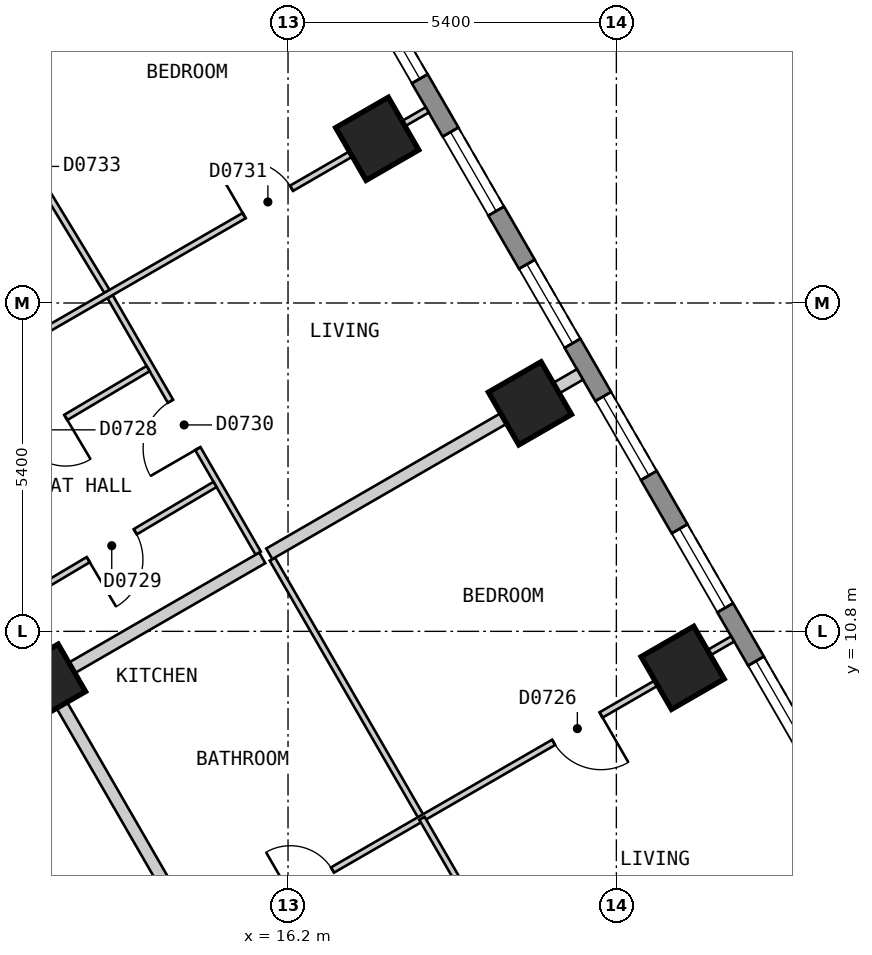
"""IFC4 building model, lengths in metres.
Left out: names, types, materials, properties, quantities, classifications, styles, units other than length and angle.
Written with IfcOpenShell. Run it as: python <this file> out.ifc"""

import sys

from ifc_helpers import new_model, si_unit, direction, frame, frame_2d, origin, origin_2d, place, context, subcontext, project, spatial, polyline, rectangle, outline, extrude, element, fill, save


model = new_model("IFC4")
c1 = context("Model", 3, precision=1e-05, world=origin(), true_north=direction((0.0, 1.0)))
c2 = subcontext(c1, "Body", "Model", "MODEL_VIEW")
j1 = project(units=[si_unit("LENGTHUNIT", "METRE"), si_unit("PLANEANGLEUNIT", "RADIAN")], contexts=[c1])
p1 = place(None, origin())
s1 = spatial("IfcSite", under=j1, at=p1, CompositionType="ELEMENT")
p2 = place(p1, origin())
s2 = spatial("IfcBuilding", under=s1, at=p2, CompositionType="ELEMENT")
p3 = place(p2, frame((0.0, 0.0, 93.0)))
s3 = spatial("IfcBuildingStorey", under=s2, at=p3, CompositionType="ELEMENT", Elevation=93.0)
for number, where, z_axis, x_axis in (
    (1, (22.69, 10.2, 0.0), (0.0, 0.0, 1.0), (-0.5, 0.866, 0.0)),
    (2, (20.179, 14.55, 0.0), (0.0, 0.0, 1.0), (-0.5, 0.866, 0.0)),
    (3, (17.667, 18.9, 0.0), (0.0, 0.0, 1.0), (-0.5, 0.866, 0.0)),
):
    element("IfcColumn", number, at=place(p3, frame(where, z_axis=z_axis, x_axis=x_axis)), inside=s3, PredefinedType="COLUMN", context=c2, shape_type="SweptSolid", body=[
        extrude(rectangle(XDim=1.0, YDim=1.0, at=origin_2d()), origin(), (0.0, 0.0, 1.0), 3.0),
    ])
p4 = place(p3, frame((12.255, 9.975, 0.0), z_axis=(0.0, 0.0, 1.0), x_axis=(-0.5, 0.866025403784, 0.0)))
e4 = element("IfcColumn", 4, at=p4, inside=s3, PredefinedType="COLUMN", context=c2, shape_type="SweptSolid", body=[
    extrude(rectangle(XDim=0.9, YDim=0.9, at=origin_2d()), origin(), (0.0, 0.0, 1.0), 3.0),
])
p5 = place(p3, frame((29.027, 1.425, 0.0), z_axis=(0.0, 0.0, 1.0), x_axis=(-0.500027479704, 0.866009537788, 0.0)))
e5 = element("IfcWall", 5, at=p5, inside=s3, PredefinedType="SOLIDWALL", context=c2, shape_type="SweptSolid", body=[
    extrude(outline(polyline([(0.0, -0.15), (26.559, -0.15), (26.478, 0.15), (0.08, 0.15), (0.0, -0.15)])), origin(), (0.0, 0.0, 1.0), 2.7),
])
p6 = place(p5, frame((1.227, 0.0, 0.15)))
e6 = element("IfcOpeningElement", 6, at=p6, cuts=e5, PredefinedType="OPENING", context=c2, shape_type="SweptSolid", body=[
    extrude(rectangle(XDim=1.5, YDim=2.1, at=frame_2d((0.75, 1.05))), frame((0.0, 0.16, 0.0), z_axis=(0.0, -1.0, 0.0), x_axis=(1.0, 0.0, 0.0)), (0.0, 0.0, 1.0), 0.32),
])
p7 = place(p5, frame((3.738, 0.0, 0.15)))
e7 = element("IfcOpeningElement", 7, at=p7, cuts=e5, PredefinedType="OPENING", context=c2, shape_type="SweptSolid", body=[
    extrude(rectangle(XDim=1.5, YDim=2.1, at=frame_2d((0.75, 1.05))), frame((0.0, 0.16, 0.0), z_axis=(0.0, -1.0, 0.0), x_axis=(1.0, 0.0, 0.0)), (0.0, 0.0, 1.0), 0.32),
])
p8 = place(p5, frame((6.25, 0.0, 0.15)))
e8 = element("IfcOpeningElement", 8, at=p8, cuts=e5, PredefinedType="OPENING", context=c2, shape_type="SweptSolid", body=[
    extrude(rectangle(XDim=1.5, YDim=2.1, at=frame_2d((0.75, 1.05))), frame((0.0, 0.16, 0.0), z_axis=(0.0, -1.0, 0.0), x_axis=(1.0, 0.0, 0.0)), (0.0, 0.0, 1.0), 0.32),
])
p9 = place(p5, frame((8.761, 0.0, 0.15)))
e9 = element("IfcOpeningElement", 9, at=p9, cuts=e5, PredefinedType="OPENING", context=c2, shape_type="SweptSolid", body=[
    extrude(rectangle(XDim=1.5, YDim=2.1, at=frame_2d((0.75, 1.05))), frame((0.0, 0.16, 0.0), z_axis=(0.0, -1.0, 0.0), x_axis=(1.0, 0.0, 0.0)), (0.0, 0.0, 1.0), 0.32),
])
p10 = place(p5, frame((11.273, 0.0, 0.15)))
e10 = element("IfcOpeningElement", 10, at=p10, cuts=e5, PredefinedType="OPENING", context=c2, shape_type="SweptSolid", body=[
    extrude(rectangle(XDim=1.5, YDim=2.1, at=frame_2d((0.75, 1.05))), frame((0.0, 0.16, 0.0), z_axis=(0.0, -1.0, 0.0), x_axis=(1.0, 0.0, 0.0)), (0.0, 0.0, 1.0), 0.32),
])
p11 = place(p5, frame((13.785, 0.0, 0.15)))
e11 = element("IfcOpeningElement", 11, at=p11, cuts=e5, PredefinedType="OPENING", context=c2, shape_type="SweptSolid", body=[
    extrude(rectangle(XDim=1.5, YDim=2.1, at=frame_2d((0.75, 1.05))), frame((0.0, 0.16, 0.0), z_axis=(0.0, -1.0, 0.0), x_axis=(1.0, 0.0, 0.0)), (0.0, 0.0, 1.0), 0.32),
])
p12 = place(p5, frame((16.296, 0.0, 0.15)))
e12 = element("IfcOpeningElement", 12, at=p12, cuts=e5, PredefinedType="OPENING", context=c2, shape_type="SweptSolid", body=[
    extrude(rectangle(XDim=1.5, YDim=2.1, at=frame_2d((0.75, 1.05))), frame((0.0, 0.16, 0.0), z_axis=(0.0, -1.0, 0.0), x_axis=(1.0, 0.0, 0.0)), (0.0, 0.0, 1.0), 0.32),
])
p13 = place(p5, frame((18.807, 0.0, 0.15)))
e13 = element("IfcOpeningElement", 13, at=p13, cuts=e5, PredefinedType="OPENING", context=c2, shape_type="SweptSolid", body=[
    extrude(rectangle(XDim=1.5, YDim=2.1, at=frame_2d((0.75, 1.05))), frame((0.0, 0.16, 0.0), z_axis=(0.0, -1.0, 0.0), x_axis=(1.0, 0.0, 0.0)), (0.0, 0.0, 1.0), 0.32),
])
p14 = place(p5, frame((21.319, 0.0, 0.15)))
e14 = element("IfcOpeningElement", 14, at=p14, cuts=e5, PredefinedType="OPENING", context=c2, shape_type="SweptSolid", body=[
    extrude(rectangle(XDim=1.5, YDim=2.1, at=frame_2d((0.75, 1.05))), frame((0.0, 0.16, 0.0), z_axis=(0.0, -1.0, 0.0), x_axis=(1.0, 0.0, 0.0)), (0.0, 0.0, 1.0), 0.32),
])
p15 = place(p5, frame((23.831, 0.0, 0.15)))
e15 = element("IfcOpeningElement", 15, at=p15, cuts=e5, PredefinedType="OPENING", context=c2, shape_type="SweptSolid", body=[
    extrude(rectangle(XDim=1.5, YDim=2.1, at=frame_2d((0.75, 1.05))), frame((0.0, 0.16, 0.0), z_axis=(0.0, -1.0, 0.0), x_axis=(1.0, 0.0, 0.0)), (0.0, 0.0, 1.0), 0.32),
])
p16 = place(p3, frame((10.913, 7.899, 0.0), z_axis=(0.0, 0.0, 1.0), x_axis=(0.500028940566, -0.866008694296, 0.0)))
e16 = element("IfcWall", 16, at=p16, inside=s3, PredefinedType="PARTITIONING", context=c2, shape_type="SweptSolid", body=[
    extrude(rectangle(XDim=10.159, YDim=0.2, at=frame_2d((5.08, 0.0))), origin(), (0.0, 0.0, 1.0), 2.7),
])
p17 = place(p16, frame((4.63, 0.0, 0.0)))
e17 = element("IfcOpeningElement", 17, at=p17, cuts=e16, PredefinedType="OPENING", context=c2, shape_type="SweptSolid", body=[
    extrude(rectangle(XDim=0.9, YDim=2.1, at=frame_2d((0.45, 1.05))), frame((0.0, 0.11, 0.0), z_axis=(0.0, -1.0, 0.0), x_axis=(1.0, 0.0, 0.0)), (0.0, 0.0, 1.0), 0.22),
])
p18 = place(p3, frame((8.488, 16.5, 0.0), z_axis=(0.0, 0.0, 1.0), x_axis=(0.499986836607, -0.86603300354, 0.0)))
e18 = element("IfcWall", 18, at=p18, inside=s3, PredefinedType="PARTITIONING", context=c2, shape_type="SweptSolid", body=[
    extrude(rectangle(XDim=20.09, YDim=0.2, at=frame_2d((10.045, 0.0))), origin(), (0.0, 0.0, 1.0), 2.7),
])
p19 = place(p18, frame((14.569, 0.0, 0.0)))
e19 = element("IfcOpeningElement", 19, at=p19, cuts=e18, PredefinedType="OPENING", context=c2, shape_type="SweptSolid", body=[
    extrude(rectangle(XDim=1.0, YDim=2.1, at=frame_2d((0.5, 1.05))), frame((0.0, 0.11, 0.0), z_axis=(0.0, -1.0, 0.0), x_axis=(1.0, 0.0, 0.0)), (0.0, 0.0, 1.0), 0.22),
])
p20 = place(p18, frame((4.547, 0.0, 0.0)))
e20 = element("IfcOpeningElement", 20, at=p20, cuts=e18, PredefinedType="OPENING", context=c2, shape_type="SweptSolid", body=[
    extrude(rectangle(XDim=1.0, YDim=2.1, at=frame_2d((0.5, 1.05))), frame((0.0, 0.11, 0.0), z_axis=(0.0, -1.0, 0.0), x_axis=(1.0, 0.0, 0.0)), (0.0, 0.0, 1.0), 0.22),
])
p21 = place(p3, frame((10.706, 20.543, 0.0), z_axis=(0.0, 0.0, 1.0), x_axis=(0.518240414093, -0.855234981278, 0.0)))
e21 = element("IfcWall", 21, at=p21, inside=s3, PredefinedType="PARTITIONING", context=c2, shape_type="SweptSolid", body=[
    extrude(rectangle(XDim=4.855, YDim=0.1, at=frame_2d((2.427, 0.0))), origin(), (0.0, 0.0, 1.0), 2.7),
])
p22 = place(p21, frame((2.052, 0.0, 0.0)))
e22 = element("IfcOpeningElement", 22, at=p22, cuts=e21, PredefinedType="OPENING", context=c2, shape_type="SweptSolid", body=[
    extrude(rectangle(XDim=0.8, YDim=2.1, at=frame_2d((0.4, 1.05))), frame((0.0, 0.06, 0.0), z_axis=(0.0, -1.0, 0.0), x_axis=(1.0, 0.0, 0.0)), (0.0, 0.0, 1.0), 0.12),
])
p23 = place(p3, frame((13.273, 16.305, 0.0), z_axis=(0.0, 0.0, 1.0), x_axis=(0.500093956194, -0.865971151354, 0.0)))
e23 = element("IfcWall", 23, at=p23, inside=s3, PredefinedType="PARTITIONING", context=c2, shape_type="SweptSolid", body=[
    extrude(rectangle(XDim=4.873, YDim=0.1, at=frame_2d((2.437, 0.0))), origin(), (0.0, 0.0, 1.0), 2.7),
])
p24 = place(p23, frame((1.987, 0.0, 0.0)))
e24 = element("IfcOpeningElement", 24, at=p24, cuts=e23, PredefinedType="OPENING", context=c2, shape_type="SweptSolid", body=[
    extrude(rectangle(XDim=0.9, YDim=2.1, at=frame_2d((0.45, 1.05))), frame((0.0, 0.06, 0.0), z_axis=(0.0, -1.0, 0.0), x_axis=(1.0, 0.0, 0.0)), (0.0, 0.0, 1.0), 0.12),
])
p25 = place(p3, frame((15.942, 11.988, 0.0), z_axis=(0.0, 0.0, 1.0), x_axis=(0.499995794706, -0.866027831699, 0.0)))
e25 = element("IfcWall", 25, at=p25, inside=s3, PredefinedType="PARTITIONING", context=c2, shape_type="SweptSolid", body=[
    extrude(rectangle(XDim=4.922, YDim=0.1, at=frame_2d((2.461, 0.0))), origin(), (0.0, 0.0, 1.0), 2.7),
])
p26 = place(p3, frame((14.853, 5.675, 0.0), z_axis=(0.0, 0.0, 1.0), x_axis=(0.866016855193, 0.500014806302, 0.0)))
e26 = element("IfcWall", 26, at=p26, inside=s3, PredefinedType="PARTITIONING", context=c2, shape_type="SweptSolid", body=[
    extrude(rectangle(XDim=10.0, YDim=0.1, at=frame_2d((5.0, 0.0))), origin(), (0.0, 0.0, 1.0), 2.7),
])
p27 = place(p26, frame((1.6, 0.0, 0.0)))
e27 = element("IfcOpeningElement", 27, at=p27, cuts=e26, PredefinedType="OPENING", context=c2, shape_type="SweptSolid", body=[
    extrude(rectangle(XDim=0.8, YDim=2.1, at=frame_2d((0.4, 1.05))), frame((0.0, 0.06, 0.0), z_axis=(0.0, -1.0, 0.0), x_axis=(1.0, 0.0, 0.0)), (0.0, 0.0, 1.0), 0.12),
])
p28 = place(p26, frame((6.6, 0.0, 0.0)))
e28 = element("IfcOpeningElement", 28, at=p28, cuts=e26, PredefinedType="OPENING", context=c2, shape_type="SweptSolid", body=[
    extrude(rectangle(XDim=0.9, YDim=2.1, at=frame_2d((0.45, 1.05))), frame((0.0, 0.06, 0.0), z_axis=(0.0, -1.0, 0.0), x_axis=(1.0, 0.0, 0.0)), (0.0, 0.0, 1.0), 0.12),
])
p29 = place(p3, frame((9.83, 14.375, 0.0), z_axis=(0.0, 0.0, 1.0), x_axis=(0.866016855193, 0.500014806302, 0.0)))
e29 = element("IfcWall", 29, at=p29, inside=s3, PredefinedType="PARTITIONING", context=c2, shape_type="SweptSolid", body=[
    extrude(rectangle(XDim=10.0, YDim=0.1, at=frame_2d((5.0, 0.0))), origin(), (0.0, 0.0, 1.0), 2.7),
])
p30 = place(p29, frame((6.523, 0.0, 0.0)))
e30 = element("IfcOpeningElement", 30, at=p30, cuts=e29, PredefinedType="OPENING", context=c2, shape_type="SweptSolid", body=[
    extrude(rectangle(XDim=0.9, YDim=2.1, at=frame_2d((0.45, 1.05))), frame((0.0, 0.06, 0.0), z_axis=(0.0, -1.0, 0.0), x_axis=(1.0, 0.0, 0.0)), (0.0, 0.0, 1.0), 0.12),
])
p31 = place(p3, frame((11.647, 11.227, 0.0), z_axis=(0.0, 0.0, 1.0), x_axis=(0.859997349349, 0.510298500011, 0.0)))
e31 = element("IfcWall", 31, at=p31, inside=s3, PredefinedType="PARTITIONING", context=c2, shape_type="SweptSolid", body=[
    extrude(rectangle(XDim=3.898, YDim=0.1, at=frame_2d((1.949, 0.0))), origin(), (0.0, 0.0, 1.0), 2.7),
])
p32 = place(p31, frame((1.473, 0.0, 0.0)))
e32 = element("IfcOpeningElement", 32, at=p32, cuts=e31, PredefinedType="OPENING", context=c2, shape_type="SweptSolid", body=[
    extrude(rectangle(XDim=0.9, YDim=2.1, at=frame_2d((0.45, 1.05))), frame((0.0, 0.06, 0.0), z_axis=(0.0, -1.0, 0.0), x_axis=(1.0, 0.0, 0.0)), (0.0, 0.0, 1.0), 0.12),
])
p33 = place(p3, frame((10.547, 13.133, 0.0), z_axis=(0.0, 0.0, 1.0), x_axis=(0.860090994311, 0.510140648749, 0.0)))
e33 = element("IfcWall", 33, at=p33, inside=s3, PredefinedType="PARTITIONING", context=c2, shape_type="SweptSolid", body=[
    extrude(rectangle(XDim=3.897, YDim=0.1, at=frame_2d((1.948, 0.0))), origin(), (0.0, 0.0, 1.0), 2.7),
])
p34 = place(p33, frame((1.523, 0.0, 0.0)))
e34 = element("IfcOpeningElement", 34, at=p34, cuts=e33, PredefinedType="OPENING", context=c2, shape_type="SweptSolid", body=[
    extrude(rectangle(XDim=0.8, YDim=2.1, at=frame_2d((0.4, 1.05))), frame((0.0, 0.06, 0.0), z_axis=(0.0, -1.0, 0.0), x_axis=(1.0, 0.0, 0.0)), (0.0, 0.0, 1.0), 0.12),
])
p35 = place(p3, frame((12.342, 10.025, 0.0), z_axis=(0.0, 0.0, 1.0), x_axis=(0.866033886885, 0.499985306551, 0.0)))
e35 = element("IfcWall", 35, at=p35, inside=s3, PredefinedType="PARTITIONING", context=c2, shape_type="SweptSolid", body=[
    extrude(rectangle(XDim=3.966, YDim=0.2, at=frame_2d((1.983, 0.0))), origin(), (0.0, 0.0, 1.0), 2.7),
])
p36 = place(p3, frame((15.892, 12.075, 0.0), z_axis=(0.0, 0.0, 1.0), x_axis=(0.866000883696, 0.500042467634, 0.0)))
e36 = element("IfcWall", 36, at=p36, inside=s3, PredefinedType="PARTITIONING", context=c2, shape_type="SweptSolid", body=[
    extrude(rectangle(XDim=5.899, YDim=0.2, at=frame_2d((2.95, 0.0))), origin(), (0.0, 0.0, 1.0), 2.7),
])
p37 = place(p3, frame((18.403, 7.725, 0.0), z_axis=(0.0, 0.0, 1.0), x_axis=(0.500014231302, -0.866017187182, 0.0)))
e37 = element("IfcWall", 37, at=p37, inside=s3, PredefinedType="PARTITIONING", context=c2, shape_type="SweptSolid", body=[
    extrude(rectangle(XDim=4.973, YDim=0.1, at=frame_2d((2.487, 0.0))), origin(), (0.0, 0.0, 1.0), 2.7),
])
p38 = place(p37, frame((2.061, 0.0, 0.0)))
e38 = element("IfcOpeningElement", 38, at=p38, cuts=e37, PredefinedType="OPENING", context=c2, shape_type="SweptSolid", body=[
    extrude(rectangle(XDim=0.9, YDim=2.1, at=frame_2d((0.45, 1.05))), frame((0.0, 0.06, 0.0), z_axis=(0.0, -1.0, 0.0), x_axis=(1.0, 0.0, 0.0)), (0.0, 0.0, 1.0), 0.12),
])
p39 = place(p9, origin())
e39 = element("IfcWindow", 39, at=p39, inside=s3, PartitioningType="SINGLE_PANEL", PredefinedType="WINDOW", context=c2, shape_type="SweptSolid", body=[
    extrude(rectangle(XDim=1.5, YDim=2.1, at=frame_2d((0.75, 1.05))), frame((0.0, 0.03, 0.0), z_axis=(0.0, -1.0, 0.0), x_axis=(1.0, 0.0, 0.0)), (0.0, 0.0, 1.0), 0.06),
])
fill(e9, e39)
p40 = place(p10, origin())
e40 = element("IfcWindow", 40, at=p40, inside=s3, PartitioningType="SINGLE_PANEL", PredefinedType="WINDOW", context=c2, shape_type="SweptSolid", body=[
    extrude(rectangle(XDim=1.5, YDim=2.1, at=frame_2d((0.75, 1.05))), frame((0.0, 0.03, 0.0), z_axis=(0.0, -1.0, 0.0), x_axis=(1.0, 0.0, 0.0)), (0.0, 0.0, 1.0), 0.06),
])
fill(e10, e40)
p41 = place(p11, origin())
e41 = element("IfcWindow", 41, at=p41, inside=s3, PartitioningType="SINGLE_PANEL", PredefinedType="WINDOW", context=c2, shape_type="SweptSolid", body=[
    extrude(rectangle(XDim=1.5, YDim=2.1, at=frame_2d((0.75, 1.05))), frame((0.0, 0.03, 0.0), z_axis=(0.0, -1.0, 0.0), x_axis=(1.0, 0.0, 0.0)), (0.0, 0.0, 1.0), 0.06),
])
fill(e11, e41)
p42 = place(p12, origin())
e42 = element("IfcWindow", 42, at=p42, inside=s3, PartitioningType="SINGLE_PANEL", PredefinedType="WINDOW", context=c2, shape_type="SweptSolid", body=[
    extrude(rectangle(XDim=1.5, YDim=2.1, at=frame_2d((0.75, 1.05))), frame((0.0, 0.03, 0.0), z_axis=(0.0, -1.0, 0.0), x_axis=(1.0, 0.0, 0.0)), (0.0, 0.0, 1.0), 0.06),
])
fill(e12, e42)
p43 = place(p13, origin())
e43 = element("IfcWindow", 43, at=p43, inside=s3, PartitioningType="SINGLE_PANEL", PredefinedType="WINDOW", context=c2, shape_type="SweptSolid", body=[
    extrude(rectangle(XDim=1.5, YDim=2.1, at=frame_2d((0.75, 1.05))), frame((0.0, 0.03, 0.0), z_axis=(0.0, -1.0, 0.0), x_axis=(1.0, 0.0, 0.0)), (0.0, 0.0, 1.0), 0.06),
])
fill(e13, e43)
p44 = place(p14, origin())
e44 = element("IfcWindow", 44, at=p44, inside=s3, PartitioningType="SINGLE_PANEL", PredefinedType="WINDOW", context=c2, shape_type="SweptSolid", body=[
    extrude(rectangle(XDim=1.5, YDim=2.1, at=frame_2d((0.75, 1.05))), frame((0.0, 0.03, 0.0), z_axis=(0.0, -1.0, 0.0), x_axis=(1.0, 0.0, 0.0)), (0.0, 0.0, 1.0), 0.06),
])
fill(e14, e44)
p45 = place(p27, origin())
e45 = element("IfcDoor", 45, at=p45, inside=s3, OperationType="SINGLE_SWING_LEFT", PredefinedType="DOOR", context=c2, shape_type="SweptSolid", body=[
    extrude(rectangle(XDim=0.8, YDim=2.1, at=frame_2d((0.4, 1.05))), frame((0.0, 0.025, 0.0), z_axis=(0.0, -1.0, 0.0), x_axis=(1.0, 0.0, 0.0)), (0.0, 0.0, 1.0), 0.05),
])
fill(e27, e45)
p46 = place(p28, origin())
e46 = element("IfcDoor", 46, at=p46, inside=s3, OperationType="SINGLE_SWING_RIGHT", PredefinedType="DOOR", context=c2, shape_type="SweptSolid", body=[
    extrude(rectangle(XDim=0.9, YDim=2.1, at=frame_2d((0.45, 1.05))), frame((0.0, 0.025, 0.0), z_axis=(0.0, -1.0, 0.0), x_axis=(1.0, 0.0, 0.0)), (0.0, 0.0, 1.0), 0.05),
])
fill(e28, e46)
p47 = place(p34, origin())
e47 = element("IfcDoor", 47, at=p47, inside=s3, OperationType="SINGLE_SWING_RIGHT", PredefinedType="DOOR", context=c2, shape_type="SweptSolid", body=[
    extrude(rectangle(XDim=0.8, YDim=2.1, at=frame_2d((0.4, 1.05))), frame((0.0, 0.025, 0.0), z_axis=(0.0, -1.0, 0.0), x_axis=(1.0, 0.0, 0.0)), (0.0, 0.0, 1.0), 0.05),
])
fill(e34, e47)
p48 = place(p32, origin())
e48 = element("IfcDoor", 48, at=p48, inside=s3, OperationType="SINGLE_SWING_LEFT", PredefinedType="DOOR", context=c2, shape_type="SweptSolid", body=[
    extrude(rectangle(XDim=0.9, YDim=2.1, at=frame_2d((0.45, 1.05))), frame((0.0, 0.025, 0.0), z_axis=(0.0, -1.0, 0.0), x_axis=(1.0, 0.0, 0.0)), (0.0, 0.0, 1.0), 0.05),
])
fill(e32, e48)
p49 = place(p24, origin())
e49 = element("IfcDoor", 49, at=p49, inside=s3, OperationType="SINGLE_SWING_RIGHT", PredefinedType="DOOR", context=c2, shape_type="SweptSolid", body=[
    extrude(rectangle(XDim=0.9, YDim=2.1, at=frame_2d((0.45, 1.05))), frame((0.0, 0.025, 0.0), z_axis=(0.0, -1.0, 0.0), x_axis=(1.0, 0.0, 0.0)), (0.0, 0.0, 1.0), 0.05),
])
fill(e24, e49)
p50 = place(p30, origin())
e50 = element("IfcDoor", 50, at=p50, inside=s3, OperationType="SINGLE_SWING_LEFT", PredefinedType="DOOR", context=c2, shape_type="SweptSolid", body=[
    extrude(rectangle(XDim=0.9, YDim=2.1, at=frame_2d((0.45, 1.05))), frame((0.0, 0.025, 0.0), z_axis=(0.0, -1.0, 0.0), x_axis=(1.0, 0.0, 0.0)), (0.0, 0.0, 1.0), 0.05),
])
fill(e30, e50)
save(model, sys.argv[1])
